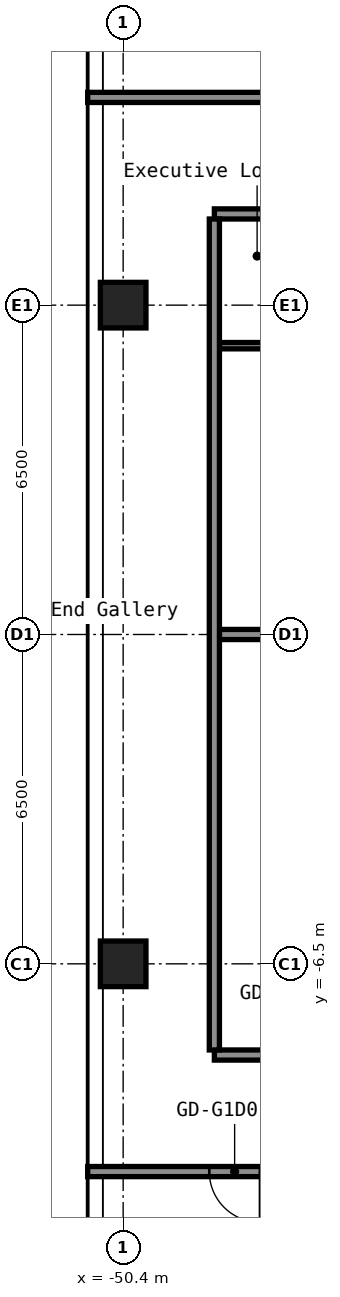
"""IFC4 building model, lengths in metres.
Left out: names, types, materials, properties, quantities, classifications, styles, units other than length and angle.
Written with IfcOpenShell. Run it as: python <this file> out.ifc"""

import sys

from ifc_helpers import new_model, si_unit, direction, frame, frame_2d, origin, origin_2d, place, context, subcontext, project, spatial, rectangle, hollow_rectangle, extrude, element, fill, save


model = new_model("IFC4")
c1 = context("Model", 3, precision=1e-05, world=origin(), true_north=direction((0.0, 1.0)))
c2 = subcontext(c1, "Body", "Model", "MODEL_VIEW")
j1 = project(units=[si_unit("LENGTHUNIT", "METRE"), si_unit("PLANEANGLEUNIT", "RADIAN")], contexts=[c1])
p1 = place(None, origin())
s1 = spatial("IfcSite", under=j1, at=p1, CompositionType="ELEMENT")
p2 = place(p1, origin())
s2 = spatial("IfcBuilding", under=s1, at=p2, CompositionType="ELEMENT")
p3 = place(p2, frame((0.0, 0.0, 29.4)))
s3 = spatial("IfcBuildingStorey", under=s2, at=p3, CompositionType="ELEMENT", Elevation=29.4)
for number, where, z_axis, x_axis in (
    (1, (-50.4, -6.5, 0.0), (0.0, 0.0, 1.0), (1.0, 0.0, 0.0)),
    (2, (-50.4, 6.5, 0.0), (0.0, 0.0, 1.0), (1.0, 0.0, 0.0)),
):
    element("IfcColumn", number, at=place(p3, frame(where, z_axis=z_axis, x_axis=x_axis)), inside=s3, PredefinedType="COLUMN", context=c2, shape_type="SweptSolid", body=[
        extrude(hollow_rectangle(XDim=0.9, YDim=0.9, WallThickness=0.036, at=origin_2d()), origin(), (0.0, 0.0, 1.0), 2.8),
    ])
p4 = place(p3, frame((-51.1, -10.6, 0.0), z_axis=(0.0, 0.0, 1.0), x_axis=(1.0, 0.0, 0.0)))
e3 = element("IfcWall", 3, at=p4, inside=s3, PredefinedType="PARTITIONING", context=c2, shape_type="SweptSolid", body=[
    extrude(rectangle(XDim=34.3, YDim=0.2, at=frame_2d((17.15, 0.0))), origin(), (0.0, 0.0, 1.0), 2.8),
])
p5 = place(p4, frame((2.4, 0.0, 0.0)))
e4 = element("IfcOpeningElement", 4, at=p5, cuts=e3, PredefinedType="OPENING", context=c2, shape_type="SweptSolid", body=[
    extrude(rectangle(XDim=1.0, YDim=2.1, at=frame_2d((0.5, 1.05))), frame((0.0, 0.11, 0.0), z_axis=(0.0, -1.0, 0.0), x_axis=(1.0, 0.0, 0.0)), (0.0, 0.0, 1.0), 0.22),
])
p6 = place(p4, frame((11.1, 0.0, 0.0)))
e5 = element("IfcOpeningElement", 5, at=p6, cuts=e3, PredefinedType="OPENING", context=c2, shape_type="SweptSolid", body=[
    extrude(rectangle(XDim=1.0, YDim=2.1, at=frame_2d((0.5, 1.05))), frame((0.0, 0.11, 0.0), z_axis=(0.0, -1.0, 0.0), x_axis=(1.0, 0.0, 0.0)), (0.0, 0.0, 1.0), 0.22),
])
p7 = place(p4, frame((20.35, 0.0, 0.0)))
e6 = element("IfcOpeningElement", 6, at=p7, cuts=e3, PredefinedType="OPENING", context=c2, shape_type="SweptSolid", body=[
    extrude(rectangle(XDim=1.0, YDim=2.1, at=frame_2d((0.5, 1.05))), frame((0.0, 0.11, 0.0), z_axis=(0.0, -1.0, 0.0), x_axis=(1.0, 0.0, 0.0)), (0.0, 0.0, 1.0), 0.22),
])
p8 = place(p4, frame((22.05, 0.0, 0.0)))
e7 = element("IfcOpeningElement", 7, at=p8, cuts=e3, PredefinedType="OPENING", context=c2, shape_type="SweptSolid", body=[
    extrude(rectangle(XDim=1.0, YDim=2.1, at=frame_2d((0.5, 1.05))), frame((0.0, 0.11, 0.0), z_axis=(0.0, -1.0, 0.0), x_axis=(1.0, 0.0, 0.0)), (0.0, 0.0, 1.0), 0.22),
])
p9 = place(p4, frame((27.9, 0.0, 0.0)))
e8 = element("IfcOpeningElement", 8, at=p9, cuts=e3, PredefinedType="OPENING", context=c2, shape_type="SweptSolid", body=[
    extrude(rectangle(XDim=1.0, YDim=2.1, at=frame_2d((0.5, 1.05))), frame((0.0, 0.11, 0.0), z_axis=(0.0, -1.0, 0.0), x_axis=(1.0, 0.0, 0.0)), (0.0, 0.0, 1.0), 0.22),
])
p10 = place(p3, frame((-48.6, -8.3, 0.0), z_axis=(0.0, 0.0, 1.0), x_axis=(1.0, 0.0, 0.0)))
e9 = element("IfcWall", 9, at=p10, inside=s3, PredefinedType="PARTITIONING", context=c2, shape_type="SweptSolid", body=[
    extrude(rectangle(XDim=15.0, YDim=0.2, at=frame_2d((7.5, 0.0))), origin(), (0.0, 0.0, 1.0), 2.8),
])
p11 = place(p10, frame((1.15, 0.0, 0.0)))
e10 = element("IfcOpeningElement", 10, at=p11, cuts=e9, PredefinedType="OPENING", context=c2, shape_type="SweptSolid", body=[
    extrude(rectangle(XDim=1.0, YDim=2.1, at=frame_2d((0.5, 1.05))), frame((0.0, 0.11, 0.0), z_axis=(0.0, -1.0, 0.0), x_axis=(1.0, 0.0, 0.0)), (0.0, 0.0, 1.0), 0.22),
])
p12 = place(p10, frame((12.0, 0.0, 0.0)))
e11 = element("IfcOpeningElement", 11, at=p12, cuts=e9, PredefinedType="OPENING", context=c2, shape_type="SweptSolid", body=[
    extrude(rectangle(XDim=1.0, YDim=2.1, at=frame_2d((0.5, 1.05))), frame((0.0, 0.11, 0.0), z_axis=(0.0, -1.0, 0.0), x_axis=(1.0, 0.0, 0.0)), (0.0, 0.0, 1.0), 0.22),
])
p13 = place(p3, frame((-48.5, 0.0, 0.0), z_axis=(0.0, 0.0, 1.0), x_axis=(1.0, 0.0, 0.0)))
e12 = element("IfcWall", 12, at=p13, inside=s3, PredefinedType="PARTITIONING", context=c2, shape_type="SweptSolid", body=[
    extrude(rectangle(XDim=14.9, YDim=0.2, at=frame_2d((7.45, 0.0))), origin(), (0.0, 0.0, 1.0), 2.8),
])
p14 = place(p3, frame((-48.5, 5.7, 0.0), z_axis=(0.0, 0.0, 1.0), x_axis=(1.0, 0.0, 0.0)))
e13 = element("IfcWall", 13, at=p14, inside=s3, PredefinedType="PARTITIONING", context=c2, shape_type="SweptSolid", body=[
    extrude(rectangle(XDim=2.238, YDim=0.125, at=frame_2d((1.119, 0.0))), origin(), (0.0, 0.0, 1.0), 2.8),
])
p15 = place(p3, frame((-48.6, 8.3, 0.0), z_axis=(0.0, 0.0, 1.0), x_axis=(1.0, 0.0, 0.0)))
e14 = element("IfcWall", 14, at=p15, inside=s3, PredefinedType="PARTITIONING", context=c2, shape_type="SweptSolid", body=[
    extrude(rectangle(XDim=15.0, YDim=0.2, at=frame_2d((7.5, 0.0))), origin(), (0.0, 0.0, 1.0), 2.8),
])
p16 = place(p15, frame((4.2, 0.0, 0.0)))
e15 = element("IfcOpeningElement", 15, at=p16, cuts=e14, PredefinedType="OPENING", context=c2, shape_type="SweptSolid", body=[
    extrude(rectangle(XDim=1.6, YDim=2.1, at=frame_2d((0.8, 1.05))), frame((0.0, 0.11, 0.0), z_axis=(0.0, -1.0, 0.0), x_axis=(1.0, 0.0, 0.0)), (0.0, 0.0, 1.0), 0.22),
])
p17 = place(p3, frame((-51.1, 10.6, 0.0), z_axis=(0.0, 0.0, 1.0), x_axis=(1.0, 0.0, 0.0)))
e16 = element("IfcWall", 16, at=p17, inside=s3, PredefinedType="PARTITIONING", context=c2, shape_type="SweptSolid", body=[
    extrude(rectangle(XDim=34.3, YDim=0.2, at=frame_2d((17.15, 0.0))), origin(), (0.0, 0.0, 1.0), 2.8),
])
p18 = place(p17, frame((4.2, 0.0, 0.0)))
e17 = element("IfcOpeningElement", 17, at=p18, cuts=e16, PredefinedType="OPENING", context=c2, shape_type="SweptSolid", body=[
    extrude(rectangle(XDim=1.0, YDim=2.1, at=frame_2d((0.5, 1.05))), frame((0.0, 0.11, 0.0), z_axis=(0.0, -1.0, 0.0), x_axis=(1.0, 0.0, 0.0)), (0.0, 0.0, 1.0), 0.22),
])
p19 = place(p17, frame((11.34, 0.0, 0.0)))
e18 = element("IfcOpeningElement", 18, at=p19, cuts=e16, PredefinedType="OPENING", context=c2, shape_type="SweptSolid", body=[
    extrude(rectangle(XDim=0.9, YDim=2.1, at=frame_2d((0.45, 1.05))), frame((0.0, 0.11, 0.0), z_axis=(0.0, -1.0, 0.0), x_axis=(1.0, 0.0, 0.0)), (0.0, 0.0, 1.0), 0.22),
])
p20 = place(p17, frame((15.54, 0.0, 0.0)))
e19 = element("IfcOpeningElement", 19, at=p20, cuts=e16, PredefinedType="OPENING", context=c2, shape_type="SweptSolid", body=[
    extrude(rectangle(XDim=0.9, YDim=2.1, at=frame_2d((0.45, 1.05))), frame((0.0, 0.11, 0.0), z_axis=(0.0, -1.0, 0.0), x_axis=(1.0, 0.0, 0.0)), (0.0, 0.0, 1.0), 0.22),
])
p21 = place(p17, frame((18.645, 0.0, 0.0)))
e20 = element("IfcOpeningElement", 20, at=p21, cuts=e16, PredefinedType="OPENING", context=c2, shape_type="SweptSolid", body=[
    extrude(rectangle(XDim=0.9, YDim=2.1, at=frame_2d((0.45, 1.05))), frame((0.0, 0.11, 0.0), z_axis=(0.0, -1.0, 0.0), x_axis=(1.0, 0.0, 0.0)), (0.0, 0.0, 1.0), 0.22),
])
p22 = place(p17, frame((22.845, 0.0, 0.0)))
e21 = element("IfcOpeningElement", 21, at=p22, cuts=e16, PredefinedType="OPENING", context=c2, shape_type="SweptSolid", body=[
    extrude(rectangle(XDim=0.9, YDim=2.1, at=frame_2d((0.45, 1.05))), frame((0.0, 0.11, 0.0), z_axis=(0.0, -1.0, 0.0), x_axis=(1.0, 0.0, 0.0)), (0.0, 0.0, 1.0), 0.22),
])
p23 = place(p17, frame((27.215, 0.0, 0.0)))
e22 = element("IfcOpeningElement", 22, at=p23, cuts=e16, PredefinedType="OPENING", context=c2, shape_type="SweptSolid", body=[
    extrude(rectangle(XDim=0.9, YDim=2.1, at=frame_2d((0.45, 1.05))), frame((0.0, 0.11, 0.0), z_axis=(0.0, -1.0, 0.0), x_axis=(1.0, 0.0, 0.0)), (0.0, 0.0, 1.0), 0.22),
])
p24 = place(p17, frame((31.415, 0.0, 0.0)))
e23 = element("IfcOpeningElement", 23, at=p24, cuts=e16, PredefinedType="OPENING", context=c2, shape_type="SweptSolid", body=[
    extrude(rectangle(XDim=0.9, YDim=2.1, at=frame_2d((0.45, 1.05))), frame((0.0, 0.11, 0.0), z_axis=(0.0, -1.0, 0.0), x_axis=(1.0, 0.0, 0.0)), (0.0, 0.0, 1.0), 0.22),
])
p25 = place(p3, frame((-48.6, -8.2, 0.0), z_axis=(0.0, 0.0, 1.0), x_axis=(0.0, 1.0, 0.0)))
e24 = element("IfcWall", 24, at=p25, inside=s3, PredefinedType="PARTITIONING", context=c2, shape_type="SweptSolid", body=[
    extrude(rectangle(XDim=16.4, YDim=0.2, at=frame_2d((8.2, 0.0))), origin(), (0.0, 0.0, 1.0), 2.8),
])
p26 = place(p5, origin())
e25 = element("IfcDoor", 25, at=p26, inside=s3, OperationType="SINGLE_SWING_RIGHT", PredefinedType="DOOR", context=c2, shape_type="SweptSolid", body=[
    extrude(rectangle(XDim=1.0, YDim=2.1, at=frame_2d((0.5, 1.05))), frame((0.0, 0.025, 0.0), z_axis=(0.0, -1.0, 0.0), x_axis=(1.0, 0.0, 0.0)), (0.0, 0.0, 1.0), 0.05),
])
fill(e4, e25)
save(model, sys.argv[1])
